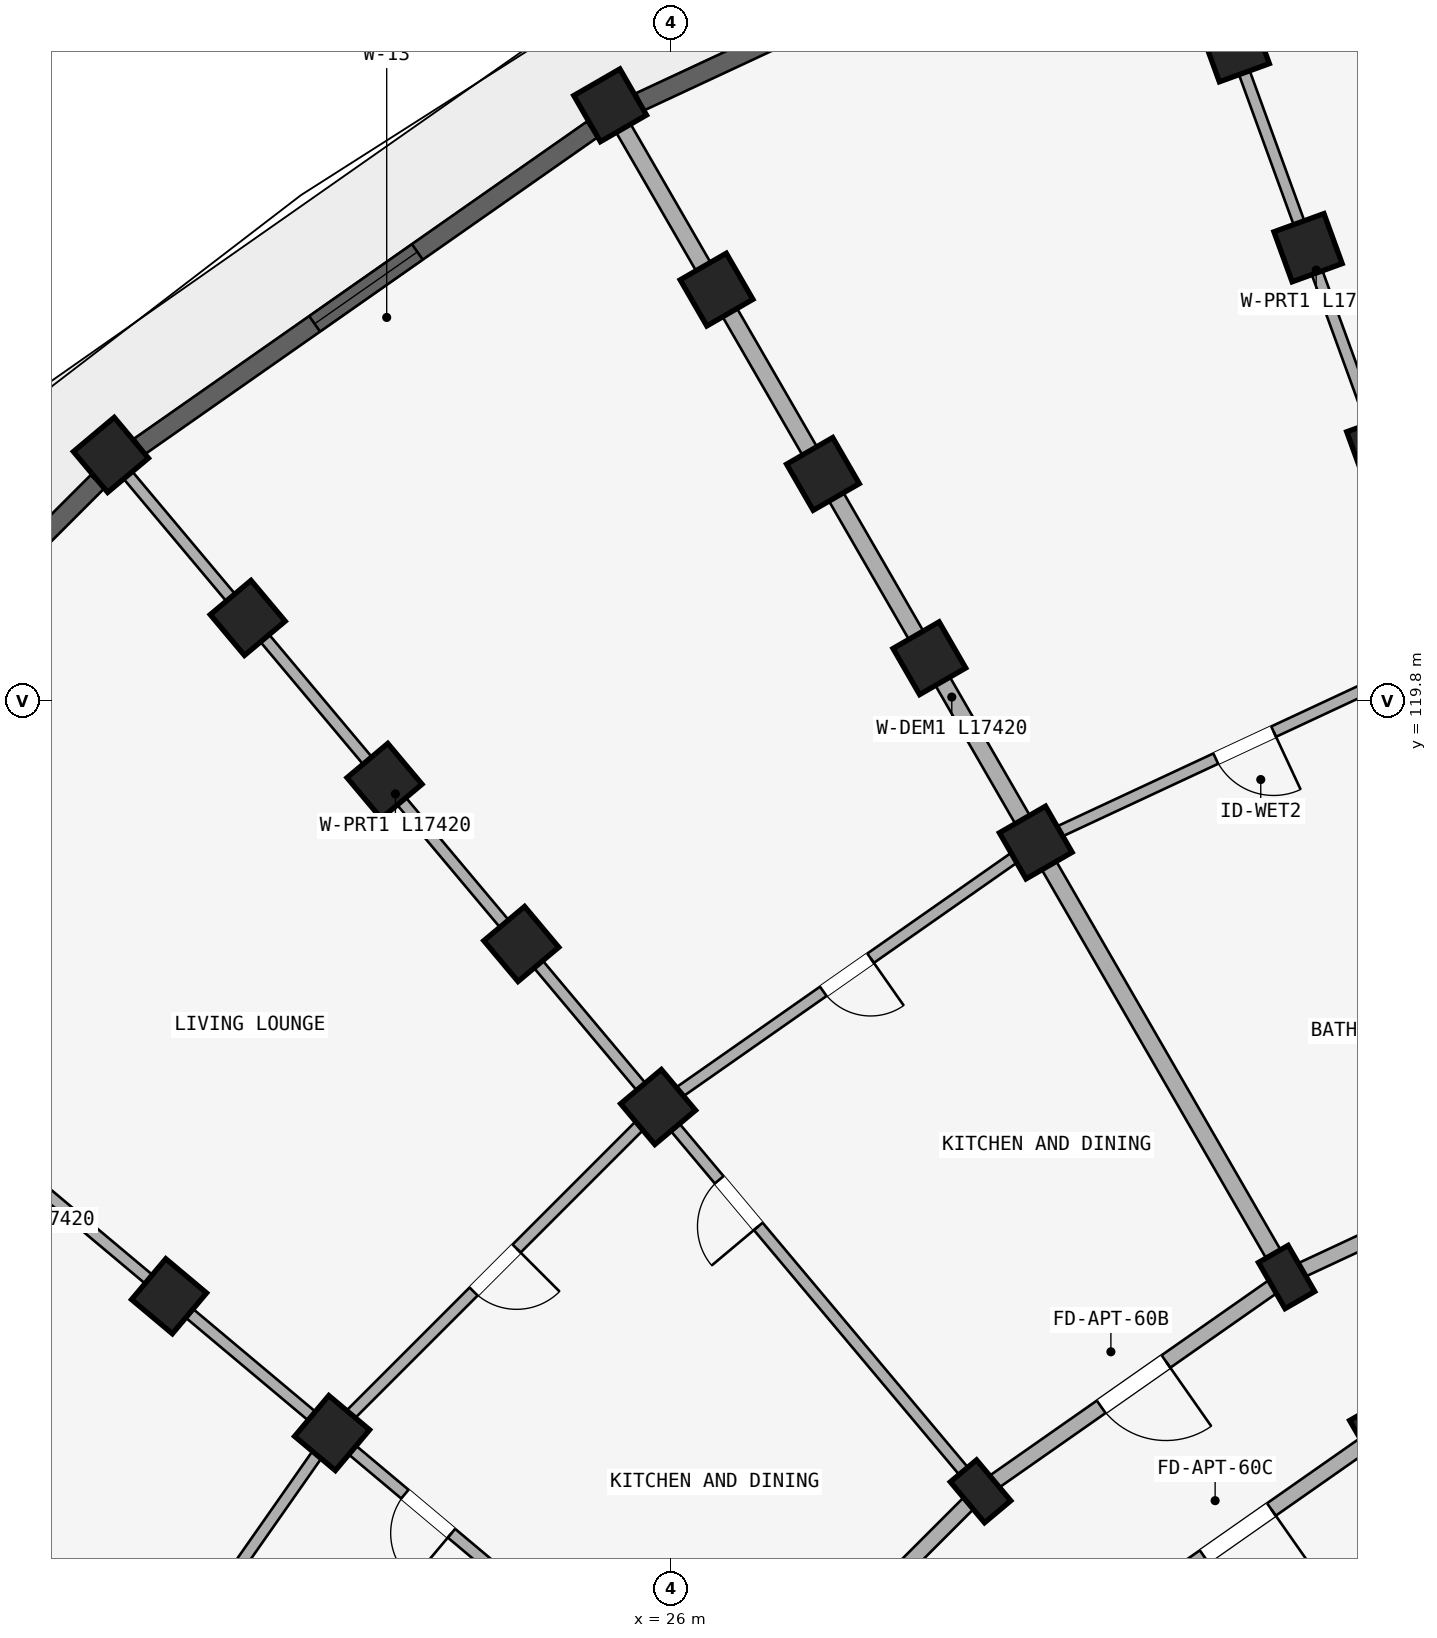
"""IFC4 building model, lengths in metres.
Left out: names, types, materials, properties, quantities, classifications, styles, units other than length and angle.
Written with IfcOpenShell. Run it as: python <this file> out.ifc"""

import sys

from ifc_helpers import new_model, si_unit, direction, frame, frame_2d, origin, origin_2d, place, context, subcontext, project, spatial, rectangle, extrude, element, fill, save


model = new_model("IFC4")
c1 = context("Model", 3, precision=1e-05, world=origin(), true_north=direction((0.0, 1.0)))
c2 = subcontext(c1, "Body", "Model", "MODEL_VIEW")
j1 = project(units=[si_unit("LENGTHUNIT", "METRE"), si_unit("PLANEANGLEUNIT", "RADIAN")], contexts=[c1])
p1 = place(None, origin())
s1 = spatial("IfcSite", under=j1, at=p1, CompositionType="ELEMENT")
p2 = place(p1, origin())
s2 = spatial("IfcBuilding", under=s1, at=p2, CompositionType="ELEMENT")
p3 = place(p2, frame((0.0, 0.0, 18.15)))
s3 = spatial("IfcBuildingStorey", under=s2, at=p3, CompositionType="ELEMENT", Elevation=18.15)
for number, where, z_axis, x_axis in (
    (1, (35.34, 123.132, 0.0), (0.0, 0.0, 1.0), (0.94, 0.342, 0.0)),
    (2, (34.382, 125.764, 0.0), (0.0, 0.0, 1.0), (0.94, 0.342, 0.0)),
    (3, (33.425, 128.395, 0.0), (0.0, 0.0, 1.0), (0.94, 0.342, 0.0)),
):
    element("IfcColumn", number, at=place(p3, frame(where, z_axis=z_axis, x_axis=x_axis)), inside=s3, PredefinedType="COLUMN", context=c2, shape_type="SweptSolid", body=[
        extrude(rectangle(XDim=0.7, YDim=0.7, at=origin_2d()), origin(), (0.0, 0.0, 1.0), 2.93),
    ])
for number, where, z_axis, x_axis in (
    (4, (35.3, 110.144, 0.0), (0.0, 0.0, 1.0), (0.866, 0.5, 0.0)),
    (5, (34.1, 112.222, 0.0), (0.0, 0.0, 1.0), (0.866, 0.5, 0.0)),
):
    element("IfcColumn", number, at=place(p3, frame(where, z_axis=z_axis, x_axis=x_axis)), inside=s3, PredefinedType="COLUMN", context=c2, shape_type="SweptSolid", body=[
        extrude(rectangle(XDim=0.45, YDim=0.7, at=origin_2d()), origin(), (0.0, 0.0, 1.0), 2.93),
    ])
for number, where, z_axis, x_axis in (
    (6, (30.8, 117.938, 0.0), (0.0, 0.0, 1.0), (0.866, 0.5, 0.0)),
    (7, (29.4, 120.363, 0.0), (0.0, 0.0, 1.0), (0.866, 0.5, 0.0)),
    (8, (28.0, 122.787, 0.0), (0.0, 0.0, 1.0), (0.866, 0.5, 0.0)),
    (9, (26.6, 125.212, 0.0), (0.0, 0.0, 1.0), (0.866, 0.5, 0.0)),
    (10, (25.2, 127.637, 0.0), (0.0, 0.0, 1.0), (0.866, 0.5, 0.0)),
):
    element("IfcColumn", number, at=place(p3, frame(where, z_axis=z_axis, x_axis=x_axis)), inside=s3, PredefinedType="COLUMN", context=c2, shape_type="SweptSolid", body=[
        extrude(rectangle(XDim=0.7, YDim=0.7, at=origin_2d()), origin(), (0.0, 0.0, 1.0), 2.93),
    ])
p4 = place(p3, frame((30.073, 109.402, 0.0), z_axis=(0.0, 0.0, 1.0), x_axis=(0.766044443119, 0.642787609687, 0.0)))
e11 = element("IfcColumn", 11, at=p4, inside=s3, PredefinedType="COLUMN", context=c2, shape_type="SweptSolid", body=[
    extrude(rectangle(XDim=0.45, YDim=0.7, at=origin_2d()), origin(), (0.0, 0.0, 1.0), 2.93),
])
for number, where, z_axis, x_axis in (
    (12, (25.831, 114.458, 0.0), (0.0, 0.0, 1.0), (0.766, 0.643, 0.0)),
    (13, (24.031, 116.603, 0.0), (0.0, 0.0, 1.0), (0.766, 0.643, 0.0)),
    (14, (22.231, 118.748, 0.0), (0.0, 0.0, 1.0), (0.766, 0.643, 0.0)),
    (15, (20.432, 120.893, 0.0), (0.0, 0.0, 1.0), (0.766, 0.643, 0.0)),
    (16, (18.632, 123.038, 0.0), (0.0, 0.0, 1.0), (0.766, 0.643, 0.0)),
    (17, (21.542, 110.169, 0.0), (0.0, 0.0, 1.0), (0.643, 0.766, 0.0)),
    (18, (19.397, 111.969, 0.0), (0.0, 0.0, 1.0), (0.643, 0.766, 0.0)),
):
    element("IfcColumn", number, at=place(p3, frame(where, z_axis=z_axis, x_axis=x_axis)), inside=s3, PredefinedType="COLUMN", context=c2, shape_type="SweptSolid", body=[
        extrude(rectangle(XDim=0.7, YDim=0.7, at=origin_2d()), origin(), (0.0, 0.0, 1.0), 2.93),
    ])
p5 = place(p3, frame((38.555, 114.299, 0.0), z_axis=(0.0, 0.0, 1.0), x_axis=(-0.906302381024, -0.422629854778, 0.0)))
e19 = element("IfcWall", 19, at=p5, inside=s3, PredefinedType="STANDARD", context=c2, shape_type="SweptSolid", body=[
    extrude(rectangle(XDim=4.915, YDim=0.2, at=frame_2d((2.458, 0.0))), origin(), (0.0, 0.0, 1.0), 2.372),
])
p6 = place(p3, frame((35.3, 110.144, 0.0), z_axis=(0.0, 0.0, 1.0), x_axis=(-0.819155404658, -0.573571637217, 0.0)))
e20 = element("IfcWall", 20, at=p6, inside=s3, PredefinedType="STANDARD", context=c2, shape_type="SweptSolid", body=[
    extrude(rectangle(XDim=4.497, YDim=0.2, at=frame_2d((2.249, 0.0))), origin(), (0.0, 0.0, 1.0), 2.372),
])
p7 = place(p6, frame((1.709, 0.0, 0.0)))
e21 = element("IfcOpeningElement", 21, at=p7, cuts=e20, PredefinedType="OPENING", context=c2, shape_type="SweptSolid", body=[
    extrude(rectangle(XDim=1.08, YDim=2.15, at=frame_2d((0.54, 1.075))), frame((0.0, 0.11, 0.0), z_axis=(0.0, -1.0, 0.0), x_axis=(1.0, 0.0, 0.0)), (0.0, 0.0, 1.0), 0.22),
])
p8 = place(p3, frame((34.1, 112.222, 0.0), z_axis=(0.0, 0.0, 1.0), x_axis=(-0.819140911474, -0.573592335331, 0.0)))
e22 = element("IfcWall", 22, at=p8, inside=s3, PredefinedType="STANDARD", context=c2, shape_type="SweptSolid", body=[
    extrude(rectangle(XDim=4.916, YDim=0.2, at=frame_2d((2.458, 0.0))), origin(), (0.0, 0.0, 1.0), 2.372),
])
p9 = place(p8, frame((1.938, 0.0, 0.0)))
e23 = element("IfcOpeningElement", 23, at=p9, cuts=e22, PredefinedType="OPENING", context=c2, shape_type="SweptSolid", body=[
    extrude(rectangle(XDim=1.04, YDim=2.15, at=frame_2d((0.52, 1.075))), frame((0.0, 0.11, 0.0), z_axis=(0.0, -1.0, 0.0), x_axis=(1.0, 0.0, 0.0)), (0.0, 0.0, 1.0), 0.22),
])
p10 = place(p3, frame((30.073, 109.402, 0.0), z_axis=(0.0, 0.0, 1.0), x_axis=(-0.707106781187, -0.707106781187, 0.0)))
e24 = element("IfcWall", 24, at=p10, inside=s3, PredefinedType="STANDARD", context=c2, shape_type="SweptSolid", body=[
    extrude(rectangle(XDim=4.916, YDim=0.2, at=frame_2d((2.458, 0.0))), origin(), (0.0, 0.0, 1.0), 2.372),
])
p11 = place(p3, frame((38.521, 114.393, 0.0), z_axis=(0.0, 0.0, 1.0), x_axis=(-0.342022120477, 0.939691901159, 0.0)))
e25 = element("IfcWall", 25, at=p11, inside=s3, PredefinedType="PARTITIONING", context=c2, shape_type="SweptSolid", body=[
    extrude(rectangle(XDim=17.42, YDim=0.15, at=frame_2d((8.71, 0.0))), origin(), (0.0, 0.0, 1.0), 2.372),
])
p12 = place(p11, frame((4.45, 0.0, 0.0)))
e26 = element("IfcOpeningElement", 26, at=p12, cuts=e25, PredefinedType="OPENING", context=c2, shape_type="SweptSolid", body=[
    extrude(rectangle(XDim=0.8, YDim=2.1, at=frame_2d((0.4, 1.05))), frame((0.0, 0.085, 0.0), z_axis=(0.0, -1.0, 0.0), x_axis=(1.0, 0.0, 0.0)), (0.0, 0.0, 1.0), 0.17),
])
p13 = place(p3, frame((34.05, 112.309, 0.0), z_axis=(0.0, 0.0, 1.0), x_axis=(-0.499997843263, 0.866026648973, 0.0)))
e27 = element("IfcWall", 27, at=p13, inside=s3, PredefinedType="STANDARD", context=c2, shape_type="SweptSolid", body=[
    extrude(rectangle(XDim=17.42, YDim=0.22, at=frame_2d((8.71, 0.0))), origin(), (0.0, 0.0, 1.0), 2.372),
])
p14 = place(p3, frame((30.009, 109.479, 0.0), z_axis=(0.0, 0.0, 1.0), x_axis=(-0.642784757967, 0.766046835987, 0.0)))
e28 = element("IfcWall", 28, at=p14, inside=s3, PredefinedType="PARTITIONING", context=c2, shape_type="SweptSolid", body=[
    extrude(rectangle(XDim=17.42, YDim=0.15, at=frame_2d((8.71, 0.0))), origin(), (0.0, 0.0, 1.0), 2.372),
])
p15 = place(p14, frame((4.45, 0.0, 0.0)))
e29 = element("IfcOpeningElement", 29, at=p15, cuts=e28, PredefinedType="OPENING", context=c2, shape_type="SweptSolid", body=[
    extrude(rectangle(XDim=0.8, YDim=2.1, at=frame_2d((0.4, 1.05))), frame((0.0, 0.085, 0.0), z_axis=(0.0, -1.0, 0.0), x_axis=(1.0, 0.0, 0.0)), (0.0, 0.0, 1.0), 0.17),
])
p16 = place(p3, frame((26.521, 105.991, 0.0), z_axis=(0.0, 0.0, 1.0), x_axis=(-0.766046835987, 0.642784757967, 0.0)))
e30 = element("IfcWall", 30, at=p16, inside=s3, PredefinedType="PARTITIONING", context=c2, shape_type="SweptSolid", body=[
    extrude(rectangle(XDim=17.42, YDim=0.15, at=frame_2d((8.71, 0.0))), origin(), (0.0, 0.0, 1.0), 2.372),
])
p17 = place(p16, frame((4.45, 0.0, 0.0)))
e31 = element("IfcOpeningElement", 31, at=p17, cuts=e30, PredefinedType="OPENING", context=c2, shape_type="SweptSolid", body=[
    extrude(rectangle(XDim=0.8, YDim=2.1, at=frame_2d((0.4, 1.05))), frame((0.0, 0.085, 0.0), z_axis=(0.0, -1.0, 0.0), x_axis=(1.0, 0.0, 0.0)), (0.0, 0.0, 1.0), 0.17),
])
p18 = place(p3, frame((23.691, 101.95, 0.0), z_axis=(0.0, 0.0, 1.0), x_axis=(-0.866026648973, 0.499997843263, 0.0)))
e32 = element("IfcWall", 32, at=p18, inside=s3, PredefinedType="STANDARD", context=c2, shape_type="SweptSolid", body=[
    extrude(rectangle(XDim=17.42, YDim=0.22, at=frame_2d((8.71, 0.0))), origin(), (0.0, 0.0, 1.0), 2.372),
])
p19 = place(p3, frame((36.298, 120.501, 0.0), z_axis=(0.0, 0.0, 1.0), x_axis=(-0.906312656069, -0.42260781991, 0.0)))
e33 = element("IfcWall", 33, at=p19, inside=s3, PredefinedType="PLUMBINGWALL", context=c2, shape_type="SweptSolid", body=[
    extrude(rectangle(XDim=6.066, YDim=0.15, at=frame_2d((3.033, 0.0))), origin(), (0.0, 0.0, 1.0), 2.372),
])
p20 = place(p19, frame((2.613, 0.0, 0.0)))
e34 = element("IfcOpeningElement", 34, at=p20, cuts=e33, PredefinedType="OPENING", context=c2, shape_type="SweptSolid", body=[
    extrude(rectangle(XDim=0.84, YDim=2.1, at=frame_2d((0.42, 1.05))), frame((0.0, 0.085, 0.0), z_axis=(0.0, -1.0, 0.0), x_axis=(1.0, 0.0, 0.0)), (0.0, 0.0, 1.0), 0.17),
])
p21 = place(p3, frame((30.8, 117.938, 0.0), z_axis=(0.0, 0.0, 1.0), x_axis=(-0.81913926159, -0.573594691504, 0.0)))
e35 = element("IfcWall", 35, at=p21, inside=s3, PredefinedType="PLUMBINGWALL", context=c2, shape_type="SweptSolid", body=[
    extrude(rectangle(XDim=6.066, YDim=0.15, at=frame_2d((3.033, 0.0))), origin(), (0.0, 0.0, 1.0), 2.372),
])
p22 = place(p21, frame((2.653, 0.0, 0.0)))
e36 = element("IfcOpeningElement", 36, at=p22, cuts=e35, PredefinedType="OPENING", context=c2, shape_type="SweptSolid", body=[
    extrude(rectangle(XDim=0.76, YDim=2.05, at=frame_2d((0.38, 1.025))), frame((0.0, 0.085, 0.0), z_axis=(0.0, -1.0, 0.0), x_axis=(1.0, 0.0, 0.0)), (0.0, 0.0, 1.0), 0.17),
])
p23 = place(p3, frame((25.831, 114.458, 0.0), z_axis=(0.0, 0.0, 1.0), x_axis=(-0.707106781187, -0.707106781187, 0.0)))
e37 = element("IfcWall", 37, at=p23, inside=s3, PredefinedType="PLUMBINGWALL", context=c2, shape_type="SweptSolid", body=[
    extrude(rectangle(XDim=6.066, YDim=0.15, at=frame_2d((3.033, 0.0))), origin(), (0.0, 0.0, 1.0), 2.372),
])
p24 = place(p23, frame((2.633, 0.0, 0.0)))
e38 = element("IfcOpeningElement", 38, at=p24, cuts=e37, PredefinedType="OPENING", context=c2, shape_type="SweptSolid", body=[
    extrude(rectangle(XDim=0.8, YDim=2.1, at=frame_2d((0.4, 1.05))), frame((0.0, 0.085, 0.0), z_axis=(0.0, -1.0, 0.0), x_axis=(1.0, 0.0, 0.0)), (0.0, 0.0, 1.0), 0.17),
])
p25 = place(p3, frame((21.542, 110.169, 0.0), z_axis=(0.0, 0.0, 1.0), x_axis=(-0.573594691504, -0.81913926159, 0.0)))
e39 = element("IfcWall", 39, at=p25, inside=s3, PredefinedType="PLUMBINGWALL", context=c2, shape_type="SweptSolid", body=[
    extrude(rectangle(XDim=6.066, YDim=0.15, at=frame_2d((3.033, 0.0))), origin(), (0.0, 0.0, 1.0), 2.372),
])
p26 = place(p25, frame((2.613, 0.0, 0.0)))
e40 = element("IfcOpeningElement", 40, at=p26, cuts=e39, PredefinedType="OPENING", context=c2, shape_type="SweptSolid", body=[
    extrude(rectangle(XDim=0.84, YDim=2.1, at=frame_2d((0.42, 1.05))), frame((0.0, 0.085, 0.0), z_axis=(0.0, -1.0, 0.0), x_axis=(1.0, 0.0, 0.0)), (0.0, 0.0, 1.0), 0.17),
])
p27 = place(p3, frame((32.179, 130.754, 0.0), z_axis=(0.0, 0.0, 1.0), x_axis=(-0.90630327107, -0.422627946127, 0.0)))
e41 = element("IfcWall", 41, at=p27, inside=s3, PredefinedType="STANDARD", context=c2, shape_type="SweptSolid", body=[
    extrude(rectangle(XDim=7.267, YDim=0.25, at=frame_2d((3.633, 0.0))), origin(), (0.0, 0.0, 1.0), 2.372),
])
p28 = place(p27, frame((2.733, 0.0, 0.522)))
e42 = element("IfcOpeningElement", 42, at=p28, cuts=e41, PredefinedType="OPENING", context=c2, shape_type="SweptSolid", body=[
    extrude(rectangle(XDim=1.8, YDim=1.65, at=frame_2d((0.9, 0.825))), frame((0.0, 0.135, 0.0), z_axis=(0.0, -1.0, 0.0), x_axis=(1.0, 0.0, 0.0)), (0.0, 0.0, 1.0), 0.27),
])
p29 = place(p3, frame((24.964, 127.319, 0.0), z_axis=(0.0, 0.0, 1.0), x_axis=(-0.819159308599, -0.573566061701, 0.0)))
e43 = element("IfcWall", 43, at=p29, inside=s3, PredefinedType="STANDARD", context=c2, shape_type="SweptSolid", body=[
    extrude(rectangle(XDim=7.267, YDim=0.25, at=frame_2d((3.633, 0.0))), origin(), (0.0, 0.0, 1.0), 2.372),
])
p30 = place(p29, frame((2.808, 0.0, 0.422)))
e44 = element("IfcOpeningElement", 44, at=p30, cuts=e43, PredefinedType="OPENING", context=c2, shape_type="SweptSolid", body=[
    extrude(rectangle(XDim=1.65, YDim=1.75, at=frame_2d((0.825, 0.875))), frame((0.0, 0.135, 0.0), z_axis=(0.0, -1.0, 0.0), x_axis=(1.0, 0.0, 0.0)), (0.0, 0.0, 1.0), 0.27),
])
p31 = place(p3, frame((18.454, 122.684, 0.0), z_axis=(0.0, 0.0, 1.0), x_axis=(-0.707106781187, -0.707106781187, 0.0)))
e45 = element("IfcWall", 45, at=p31, inside=s3, PredefinedType="STANDARD", context=c2, shape_type="SweptSolid", body=[
    extrude(rectangle(XDim=7.267, YDim=0.25, at=frame_2d((3.633, 0.0))), origin(), (0.0, 0.0, 1.0), 2.372),
])
p32 = place(p31, frame((4.766, 0.0, 0.522)))
e46 = element("IfcOpeningElement", 46, at=p32, cuts=e45, PredefinedType="OPENING", context=c2, shape_type="SweptSolid", body=[
    extrude(rectangle(XDim=1.2, YDim=1.5, at=frame_2d((0.6, 0.75))), frame((0.0, 0.135, 0.0), z_axis=(0.0, -1.0, 0.0), x_axis=(1.0, 0.0, 0.0)), (0.0, 0.0, 1.0), 0.27),
])
p33 = place(p31, frame((1.943, 0.0, 0.0)))
e47 = element("IfcOpeningElement", 47, at=p33, cuts=e45, PredefinedType="OPENING", context=c2, shape_type="SweptSolid", body=[
    extrude(rectangle(XDim=1.2, YDim=2.15, at=frame_2d((0.6, 1.075))), frame((0.0, 0.135, 0.0), z_axis=(0.0, -1.0, 0.0), x_axis=(1.0, 0.0, 0.0)), (0.0, 0.0, 1.0), 0.27),
])
p34 = place(p30, origin())
e48 = element("IfcWindow", 48, at=p34, inside=s3, PartitioningType="DOUBLE_PANEL_VERTICAL", PredefinedType="WINDOW", context=c2, shape_type="SweptSolid", body=[
    extrude(rectangle(XDim=1.65, YDim=1.75, at=frame_2d((0.825, 0.875))), frame((0.0, 0.03, 0.0), z_axis=(0.0, -1.0, 0.0), x_axis=(1.0, 0.0, 0.0)), (0.0, 0.0, 1.0), 0.06),
])
fill(e44, e48)
p35 = place(p15, frame((0.8, 0.0, 0.0), z_axis=(0.0, 0.0, 1.0), x_axis=(-1.0, 0.0, 0.0)))
e49 = element("IfcDoor", 49, at=p35, inside=s3, OperationType="SINGLE_SWING_RIGHT", PredefinedType="DOOR", context=c2, shape_type="SweptSolid", body=[
    extrude(rectangle(XDim=0.8, YDim=2.1, at=frame_2d((0.4, 1.05))), frame((0.0, 0.025, 0.0), z_axis=(0.0, -1.0, 0.0), x_axis=(1.0, 0.0, 0.0)), (0.0, 0.0, 1.0), 0.05),
])
fill(e29, e49)
p36 = place(p17, frame((0.8, 0.0, 0.0), z_axis=(0.0, 0.0, 1.0), x_axis=(-1.0, 0.0, 0.0)))
e50 = element("IfcDoor", 50, at=p36, inside=s3, OperationType="SINGLE_SWING_RIGHT", PredefinedType="DOOR", context=c2, shape_type="SweptSolid", body=[
    extrude(rectangle(XDim=0.8, YDim=2.1, at=frame_2d((0.4, 1.05))), frame((0.0, 0.025, 0.0), z_axis=(0.0, -1.0, 0.0), x_axis=(1.0, 0.0, 0.0)), (0.0, 0.0, 1.0), 0.05),
])
fill(e31, e50)
p37 = place(p20, frame((0.84, 0.0, 0.0), z_axis=(0.0, 0.0, 1.0), x_axis=(-1.0, 0.0, 0.0)))
e51 = element("IfcDoor", 51, at=p37, inside=s3, OperationType="SINGLE_SWING_RIGHT", PredefinedType="DOOR", context=c2, shape_type="SweptSolid", body=[
    extrude(rectangle(XDim=0.84, YDim=2.1, at=frame_2d((0.42, 1.05))), frame((0.0, 0.025, 0.0), z_axis=(0.0, -1.0, 0.0), x_axis=(1.0, 0.0, 0.0)), (0.0, 0.0, 1.0), 0.05),
])
fill(e34, e51)
p38 = place(p9, origin())
e52 = element("IfcDoor", 52, at=p38, inside=s3, OperationType="SINGLE_SWING_LEFT", PredefinedType="DOOR", context=c2, shape_type="SweptSolid", body=[
    extrude(rectangle(XDim=1.04, YDim=2.15, at=frame_2d((0.52, 1.075))), frame((0.0, 0.025, 0.0), z_axis=(0.0, -1.0, 0.0), x_axis=(1.0, 0.0, 0.0)), (0.0, 0.0, 1.0), 0.05),
])
fill(e23, e52)
p39 = place(p22, frame((0.76, 0.0, 0.0), z_axis=(0.0, 0.0, 1.0), x_axis=(-1.0, 0.0, 0.0)))
e53 = element("IfcDoor", 53, at=p39, inside=s3, OperationType="SINGLE_SWING_RIGHT", PredefinedType="DOOR", context=c2, shape_type="SweptSolid", body=[
    extrude(rectangle(XDim=0.76, YDim=2.05, at=frame_2d((0.38, 1.025))), frame((0.0, 0.025, 0.0), z_axis=(0.0, -1.0, 0.0), x_axis=(1.0, 0.0, 0.0)), (0.0, 0.0, 1.0), 0.05),
])
fill(e36, e53)
p40 = place(p24, origin())
e54 = element("IfcDoor", 54, at=p40, inside=s3, OperationType="SINGLE_SWING_LEFT", PredefinedType="DOOR", context=c2, shape_type="SweptSolid", body=[
    extrude(rectangle(XDim=0.8, YDim=2.1, at=frame_2d((0.4, 1.05))), frame((0.0, 0.025, 0.0), z_axis=(0.0, -1.0, 0.0), x_axis=(1.0, 0.0, 0.0)), (0.0, 0.0, 1.0), 0.05),
])
fill(e38, e54)
p41 = place(p7, origin())
e55 = element("IfcDoor", 55, at=p41, inside=s3, OperationType="SINGLE_SWING_LEFT", PredefinedType="DOOR", context=c2, shape_type="SweptSolid", body=[
    extrude(rectangle(XDim=1.08, YDim=2.15, at=frame_2d((0.54, 1.075))), frame((0.0, 0.025, 0.0), z_axis=(0.0, -1.0, 0.0), x_axis=(1.0, 0.0, 0.0)), (0.0, 0.0, 1.0), 0.05),
])
fill(e21, e55)
save(model, sys.argv[1])
